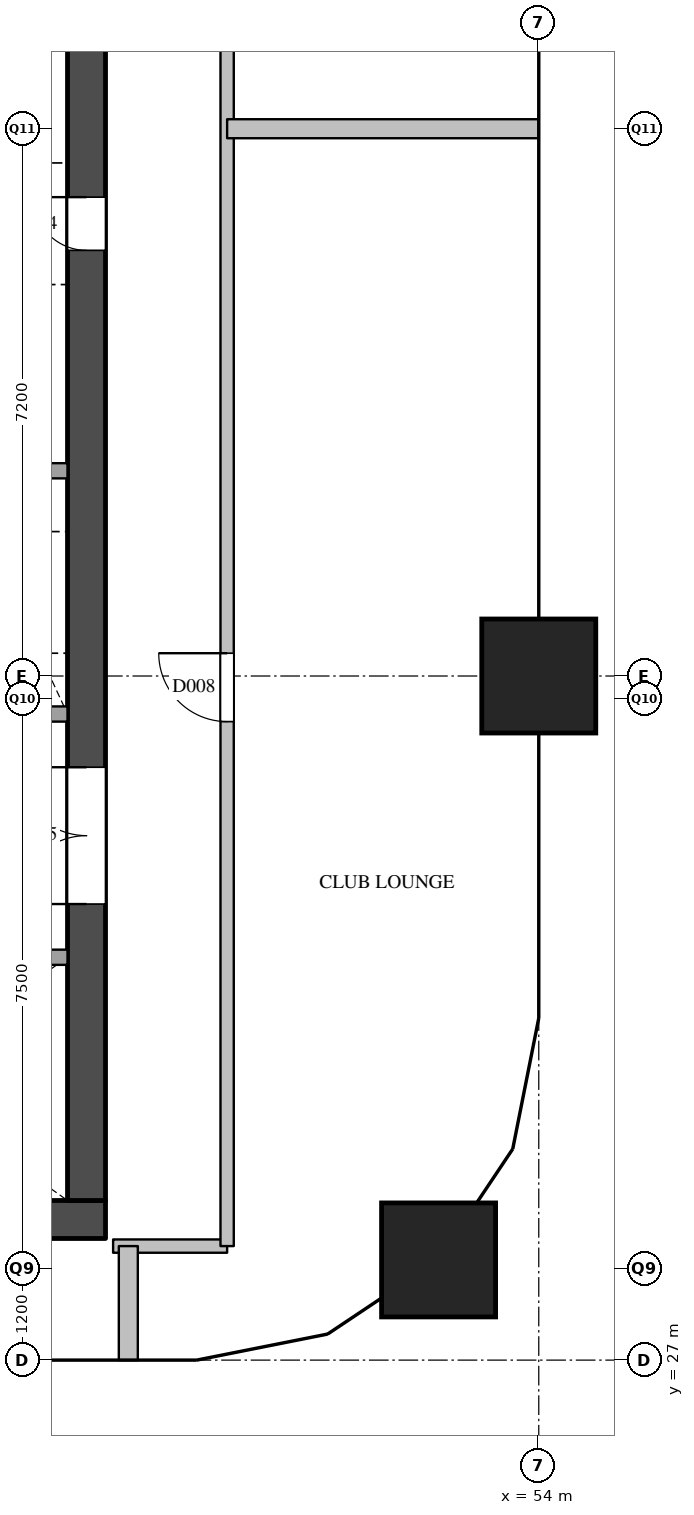
"""IFC4 building model, lengths in metres.
Left out: names, types, materials, properties, quantities, classifications, styles, units other than length and angle.
Written with IfcOpenShell. Run it as: python <this file> out.ifc"""

import sys

from ifc_helpers import new_model, si_unit, direction, frame, frame_2d, origin, origin_2d, place, context, subcontext, project, spatial, rectangle, extrude, element, fill, save


model = new_model("IFC4")
c1 = context("Model", 3, precision=1e-05, world=origin(), true_north=direction((0.0, 1.0)))
c2 = subcontext(c1, "Body", "Model", "MODEL_VIEW")
j1 = project(units=[si_unit("LENGTHUNIT", "METRE"), si_unit("PLANEANGLEUNIT", "RADIAN")], contexts=[c1])
p1 = place(None, origin())
s1 = spatial("IfcSite", under=j1, at=p1, CompositionType="ELEMENT")
p2 = place(p1, origin())
s2 = spatial("IfcBuilding", under=s1, at=p2, CompositionType="ELEMENT")
p3 = place(p2, frame((0.0, 0.0, 162.2)))
s3 = spatial("IfcBuildingStorey", under=s2, at=p3, CompositionType="ELEMENT", Elevation=162.2)
for number, where, z_axis, x_axis in (
    (1, (52.682, 28.318, 0.0), (0.0, 0.0, 1.0), (1.0, 0.0, 0.0)),
    (2, (54.0, 36.0, 0.0), (0.0, 0.0, 1.0), (1.0, 0.0, 0.0)),
):
    element("IfcColumn", number, at=place(p3, frame(where, z_axis=z_axis, x_axis=x_axis)), inside=s3, PredefinedType="COLUMN", context=c2, shape_type="SweptSolid", body=[
        extrude(rectangle(XDim=1.5, YDim=1.5, at=origin_2d()), origin(), (0.0, 0.0, 1.0), 3.9),
    ])
p4 = place(p3, frame((36.1, 28.85, 0.0), z_axis=(0.0, 0.0, 1.0), x_axis=(1.0, 0.0, 0.0)))
e3 = element("IfcWall", 3, at=p4, inside=s3, PredefinedType="SHEAR", context=c2, shape_type="SweptSolid", body=[
    extrude(rectangle(XDim=12.2, YDim=0.5, at=frame_2d((6.1, 0.0))), origin(), (0.0, 0.0, 1.0), 3.6),
])
p5 = place(p4, frame((0.95, 0.0, 0.0)))
e4 = element("IfcOpeningElement", 4, at=p5, cuts=e3, PredefinedType="OPENING", context=c2, shape_type="SweptSolid", body=[
    extrude(rectangle(XDim=1.2, YDim=2.1, at=frame_2d((0.6, 1.05))), frame((0.0, 0.26, 0.0), z_axis=(0.0, -1.0, 0.0), x_axis=(1.0, 0.0, 0.0)), (0.0, 0.0, 1.0), 0.52),
])
p6 = place(p4, frame((3.05, 0.0, 0.0)))
e5 = element("IfcOpeningElement", 5, at=p6, cuts=e3, PredefinedType="OPENING", context=c2, shape_type="SweptSolid", body=[
    extrude(rectangle(XDim=1.2, YDim=2.1, at=frame_2d((0.6, 1.05))), frame((0.0, 0.26, 0.0), z_axis=(0.0, -1.0, 0.0), x_axis=(1.0, 0.0, 0.0)), (0.0, 0.0, 1.0), 0.52),
])
p7 = place(p4, frame((5.15, 0.0, 0.0)))
e6 = element("IfcOpeningElement", 6, at=p7, cuts=e3, PredefinedType="OPENING", context=c2, shape_type="SweptSolid", body=[
    extrude(rectangle(XDim=1.2, YDim=2.1, at=frame_2d((0.6, 1.05))), frame((0.0, 0.26, 0.0), z_axis=(0.0, -1.0, 0.0), x_axis=(1.0, 0.0, 0.0)), (0.0, 0.0, 1.0), 0.52),
])
p8 = place(p3, frame((48.05, 29.1, 0.0), z_axis=(0.0, 0.0, 1.0), x_axis=(0.0, 1.0, 0.0)))
e7 = element("IfcWall", 7, at=p8, inside=s3, PredefinedType="SHEAR", context=c2, shape_type="SweptSolid", body=[
    extrude(rectangle(XDim=20.3, YDim=0.5, at=frame_2d((10.15, 0.0))), origin(), (0.0, 0.0, 1.0), 3.6),
])
p9 = place(p8, frame((12.5, 0.0, 0.0)))
e8 = element("IfcOpeningElement", 8, at=p9, cuts=e7, PredefinedType="OPENING", context=c2, shape_type="SweptSolid", body=[
    extrude(rectangle(XDim=0.7, YDim=2.1, at=frame_2d((0.35, 1.05))), frame((0.0, 0.26, 0.0), z_axis=(0.0, -1.0, 0.0), x_axis=(1.0, 0.0, 0.0)), (0.0, 0.0, 1.0), 0.52),
])
p10 = place(p8, frame((3.9, 0.0, 0.0)))
e9 = element("IfcOpeningElement", 9, at=p10, cuts=e7, PredefinedType="OPENING", context=c2, shape_type="SweptSolid", body=[
    extrude(rectangle(XDim=1.8, YDim=2.1, at=frame_2d((0.9, 1.05))), frame((0.0, 0.26, 0.0), z_axis=(0.0, -1.0, 0.0), x_axis=(1.0, 0.0, 0.0)), (0.0, 0.0, 1.0), 0.52),
])
p11 = place(p3, frame((36.6, 32.3, 0.0), z_axis=(0.0, 0.0, 1.0), x_axis=(1.0, 0.0, 0.0)))
e10 = element("IfcWall", 10, at=p11, inside=s3, PredefinedType="SOLIDWALL", context=c2, shape_type="SweptSolid", body=[
    extrude(rectangle(XDim=11.2, YDim=0.2, at=frame_2d((5.6, 0.0))), origin(), (0.0, 0.0, 1.0), 3.6),
])
p12 = place(p11, frame((7.225, 0.0, 0.0)))
e11 = element("IfcOpeningElement", 11, at=p12, cuts=e10, PredefinedType="OPENING", context=c2, shape_type="SweptSolid", body=[
    extrude(rectangle(XDim=1.2, YDim=2.1, at=frame_2d((0.6, 1.05))), frame((0.0, 0.11, 0.0), z_axis=(0.0, -1.0, 0.0), x_axis=(1.0, 0.0, 0.0)), (0.0, 0.0, 1.0), 0.22),
])
p13 = place(p11, frame((9.475, 0.0, 0.0)))
e12 = element("IfcOpeningElement", 12, at=p13, cuts=e10, PredefinedType="OPENING", context=c2, shape_type="SweptSolid", body=[
    extrude(rectangle(XDim=1.2, YDim=2.1, at=frame_2d((0.6, 1.05))), frame((0.0, 0.11, 0.0), z_axis=(0.0, -1.0, 0.0), x_axis=(1.0, 0.0, 0.0)), (0.0, 0.0, 1.0), 0.22),
])
p14 = place(p3, frame((43.3, 35.5, 0.0), z_axis=(0.0, 0.0, 1.0), x_axis=(1.0, 0.0, 0.0)))
e13 = element("IfcWall", 13, at=p14, inside=s3, PredefinedType="SOLIDWALL", context=c2, shape_type="SweptSolid", body=[
    extrude(rectangle(XDim=4.5, YDim=0.2, at=frame_2d((2.25, 0.0))), origin(), (0.0, 0.0, 1.0), 3.6),
])
p15 = place(p14, frame((0.525, 0.0, 0.0)))
e14 = element("IfcOpeningElement", 14, at=p15, cuts=e13, PredefinedType="OPENING", context=c2, shape_type="SweptSolid", body=[
    extrude(rectangle(XDim=1.2, YDim=2.1, at=frame_2d((0.6, 1.05))), frame((0.0, 0.11, 0.0), z_axis=(0.0, -1.0, 0.0), x_axis=(1.0, 0.0, 0.0)), (0.0, 0.0, 1.0), 0.22),
])
p16 = place(p14, frame((3.025, 0.0, 0.0)))
e15 = element("IfcOpeningElement", 15, at=p16, cuts=e13, PredefinedType="OPENING", context=c2, shape_type="SweptSolid", body=[
    extrude(rectangle(XDim=0.7, YDim=2.1, at=frame_2d((0.35, 1.05))), frame((0.0, 0.11, 0.0), z_axis=(0.0, -1.0, 0.0), x_axis=(1.0, 0.0, 0.0)), (0.0, 0.0, 1.0), 0.22),
])
p17 = place(p3, frame((43.3, 38.7, 0.0), z_axis=(0.0, 0.0, 1.0), x_axis=(1.0, 0.0, 0.0)))
e16 = element("IfcWall", 16, at=p17, inside=s3, PredefinedType="SOLIDWALL", context=c2, shape_type="SweptSolid", body=[
    extrude(rectangle(XDim=4.5, YDim=0.2, at=frame_2d((2.25, 0.0))), origin(), (0.0, 0.0, 1.0), 3.6),
])
p18 = place(p3, frame((48.4, 28.5, 0.0), z_axis=(0.0, 0.0, 1.0), x_axis=(1.0, 0.0, 0.0)))
e17 = element("IfcWall", 17, at=p18, inside=s3, PredefinedType="PARTITIONING", context=c2, shape_type="SweptSolid", body=[
    extrude(rectangle(XDim=1.5, YDim=0.175, at=frame_2d((0.75, 0.0))), origin(), (0.0, 0.0, 1.0), 3.6),
])
p19 = place(p3, frame((49.9, 28.5, 0.0), z_axis=(0.0, 0.0, 1.0), x_axis=(0.0, 1.0, 0.0)))
e18 = element("IfcWall", 18, at=p19, inside=s3, PredefinedType="PARTITIONING", context=c2, shape_type="SweptSolid", body=[
    extrude(rectangle(XDim=23.0, YDim=0.175, at=frame_2d((11.5, 0.0))), origin(), (0.0, 0.0, 1.0), 3.6),
])
p20 = place(p19, frame((6.9, 0.0, 0.0)))
e19 = element("IfcOpeningElement", 19, at=p20, cuts=e18, PredefinedType="OPENING", context=c2, shape_type="SweptSolid", body=[
    extrude(rectangle(XDim=0.9, YDim=2.1, at=frame_2d((0.45, 1.05))), frame((0.0, 0.097, 0.0), z_axis=(0.0, -1.0, 0.0), x_axis=(1.0, 0.0, 0.0)), (0.0, 0.0, 1.0), 0.195),
])
p21 = place(p19, frame((18.4, 0.0, 0.0)))
e20 = element("IfcOpeningElement", 20, at=p21, cuts=e18, PredefinedType="OPENING", context=c2, shape_type="SweptSolid", body=[
    extrude(rectangle(XDim=0.9, YDim=2.1, at=frame_2d((0.45, 1.05))), frame((0.0, 0.097, 0.0), z_axis=(0.0, -1.0, 0.0), x_axis=(1.0, 0.0, 0.0)), (0.0, 0.0, 1.0), 0.195),
])
p22 = place(p3, frame((49.9, 43.2, 0.0), z_axis=(0.0, 0.0, 1.0), x_axis=(1.0, 0.0, 0.0)))
e21 = element("IfcWall", 21, at=p22, inside=s3, PredefinedType="PARTITIONING", context=c2, shape_type="SweptSolid", body=[
    extrude(rectangle(XDim=4.1, YDim=0.25, at=frame_2d((2.05, 0.0))), origin(), (0.0, 0.0, 1.0), 2.6),
])
p23 = place(p3, frame((48.6, 27.0, 0.0), z_axis=(0.0, 0.0, 1.0), x_axis=(0.0, 1.0, 0.0)))
e22 = element("IfcWall", 22, at=p23, inside=s3, PredefinedType="PARTITIONING", context=c2, shape_type="SweptSolid", body=[
    extrude(rectangle(XDim=1.5, YDim=0.25, at=frame_2d((0.75, 0.0))), origin(), (0.0, 0.0, 1.0), 2.6),
])
p24 = place(p9, origin())
e23 = element("IfcDoor", 23, at=p24, inside=s3, OperationType="SINGLE_SWING_RIGHT", PredefinedType="DOOR", context=c2, shape_type="SweptSolid", body=[
    extrude(rectangle(XDim=0.7, YDim=2.1, at=frame_2d((0.35, 1.05))), frame((0.0, 0.025, 0.0), z_axis=(0.0, -1.0, 0.0), x_axis=(1.0, 0.0, 0.0)), (0.0, 0.0, 1.0), 0.05),
])
fill(e8, e23)
p25 = place(p10, origin())
e24 = element("IfcDoor", 24, at=p25, inside=s3, OperationType="DOUBLE_DOOR_SINGLE_SWING", PredefinedType="DOOR", context=c2, shape_type="SweptSolid", body=[
    extrude(rectangle(XDim=1.8, YDim=2.1, at=frame_2d((0.9, 1.05))), frame((0.0, 0.025, 0.0), z_axis=(0.0, -1.0, 0.0), x_axis=(1.0, 0.0, 0.0)), (0.0, 0.0, 1.0), 0.05),
])
fill(e9, e24)
p26 = place(p20, origin())
e25 = element("IfcDoor", 25, at=p26, inside=s3, OperationType="SINGLE_SWING_RIGHT", PredefinedType="DOOR", context=c2, shape_type="SweptSolid", body=[
    extrude(rectangle(XDim=0.9, YDim=2.1, at=frame_2d((0.45, 1.05))), frame((0.0, 0.025, 0.0), z_axis=(0.0, -1.0, 0.0), x_axis=(1.0, 0.0, 0.0)), (0.0, 0.0, 1.0), 0.05),
])
fill(e19, e25)
save(model, sys.argv[1])
